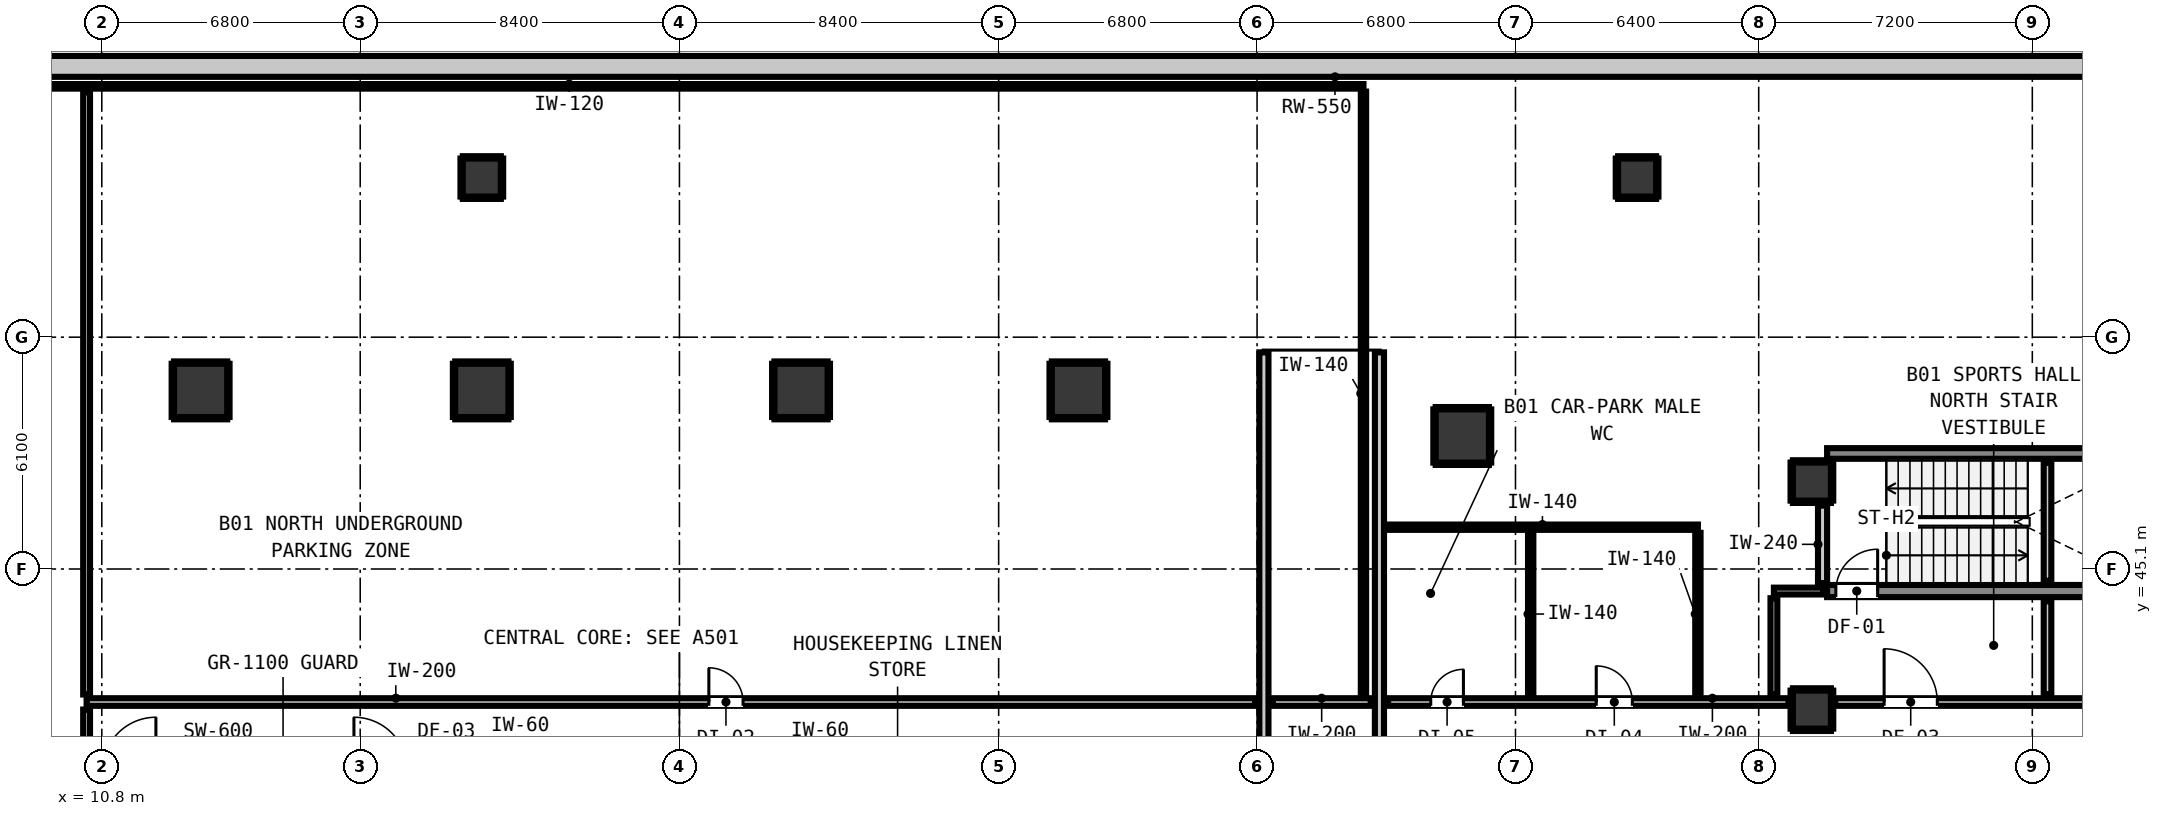
"""IFC4 building model, lengths in metres.
Left out: names, types, materials, properties, quantities, classifications, styles, units other than length and angle.
Written with IfcOpenShell. Run it as: python <this file> out.ifc"""

import sys

from ifc_helpers import new_model, si_unit, direction, frame, frame_2d, origin, origin_2d, place, context, subcontext, project, spatial, rectangle, extrude, element, fill, save


model = new_model("IFC4")
c1 = context("Model", 3, precision=1e-05, world=origin(), true_north=direction((0.0, 1.0)))
c2 = subcontext(c1, "Body", "Model", "MODEL_VIEW")
j1 = project(units=[si_unit("LENGTHUNIT", "METRE"), si_unit("PLANEANGLEUNIT", "RADIAN")], contexts=[c1])
p1 = place(None, origin())
s1 = spatial("IfcSite", under=j1, at=p1, CompositionType="ELEMENT")
p2 = place(p1, origin())
s2 = spatial("IfcBuilding", under=s1, at=p2, CompositionType="ELEMENT")
p3 = place(p2, frame((0.0, 0.0, -4.4)))
s3 = spatial("IfcBuildingStorey", under=s2, at=p3, CompositionType="ELEMENT", Elevation=-4.4)
p4 = place(p3, frame((85.0, 58.325, 0.0), z_axis=(0.0, 0.0, 1.0), x_axis=(-1.0, 0.0, 0.0)))
e1 = element("IfcWall", 1, at=p4, inside=s3, PredefinedType="SOLIDWALL", context=c2, shape_type="SweptSolid", body=[
    extrude(rectangle(XDim=83.5, YDim=0.55, at=frame_2d((41.75, 0.0))), origin(), (0.0, 0.0, 1.0), 4.4),
])
p5 = place(p3, frame((56.2, 48.14, 0.0), z_axis=(0.0, 0.0, 1.0), x_axis=(1.0, 0.0, 0.0)))
e2 = element("IfcWall", 2, at=p5, inside=s3, PredefinedType="SHEAR", context=c2, shape_type="SweptSolid", body=[
    extrude(rectangle(XDim=8.4, YDim=0.28, at=frame_2d((4.2, 0.0))), origin(), (0.0, 0.0, 1.0), 4.4),
])
p6 = place(p3, frame((56.2, 44.52, 0.0), z_axis=(0.0, 0.0, 1.0), x_axis=(1.0, 0.0, 0.0)))
e3 = element("IfcWall", 3, at=p6, inside=s3, PredefinedType="SHEAR", context=c2, shape_type="SweptSolid", body=[
    extrude(rectangle(XDim=8.4, YDim=0.32, at=frame_2d((4.2, 0.0))), origin(), (0.0, 0.0, 1.0), 4.4),
])
p7 = place(p6, frame((0.23, 0.0, 0.0)))
e4 = element("IfcOpeningElement", 4, at=p7, cuts=e3, PredefinedType="OPENING", context=c2, shape_type="SweptSolid", body=[
    extrude(rectangle(XDim=1.1, YDim=2.15, at=frame_2d((0.55, 1.075))), frame((0.0, 0.17, 0.0), z_axis=(0.0, -1.0, 0.0), x_axis=(1.0, 0.0, 0.0)), (0.0, 0.0, 1.0), 0.34),
])
for number, where, z_axis, x_axis in (
    (5, (13.4, 49.8, 0.0), (0.0, 0.0, 1.0), (1.0, 0.0, 0.0)),
    (6, (20.8, 49.8, 0.0), (0.0, 0.0, 1.0), (1.0, 0.0, 0.0)),
    (7, (29.2, 49.8, 0.0), (0.0, 0.0, 1.0), (1.0, 0.0, 0.0)),
    (8, (36.5, 49.8, 0.0), (0.0, 0.0, 1.0), (1.0, 0.0, 0.0)),
    (9, (46.6, 48.6, 0.0), (0.0, 0.0, 1.0), (1.0, 0.0, 0.0)),
):
    element("IfcColumn", number, at=place(p3, frame(where, z_axis=z_axis, x_axis=x_axis)), inside=s3, PredefinedType="COLUMN", context=c2, shape_type="SweptSolid", body=[
        extrude(rectangle(XDim=1.4, YDim=1.4, at=origin_2d()), origin(), (0.0, 0.0, 1.0), 4.4),
    ])
for number, where, z_axis, x_axis in (
    (10, (20.8, 55.4, 0.0), (0.0, 0.0, 1.0), (1.0, 0.0, 0.0)),
    (11, (51.2, 55.4, 0.0), (0.0, 0.0, 1.0), (1.0, 0.0, 0.0)),
):
    element("IfcColumn", number, at=place(p3, frame(where, z_axis=z_axis, x_axis=x_axis)), inside=s3, PredefinedType="COLUMN", context=c2, shape_type="SweptSolid", body=[
        extrude(rectangle(XDim=1.0, YDim=1.0, at=origin_2d()), origin(), (0.0, 0.0, 1.0), 4.16),
    ])
for number, where, z_axis, x_axis in (
    (12, (55.8, 41.4, 0.0), (0.0, 0.0, 1.0), (1.0, 0.0, 0.0)),
    (13, (55.8, 47.4, 0.0), (0.0, 0.0, 1.0), (1.0, 0.0, 0.0)),
):
    element("IfcColumn", number, at=place(p3, frame(where, z_axis=z_axis, x_axis=x_axis)), inside=s3, PredefinedType="COLUMN", context=c2, shape_type="SweptSolid", body=[
        extrude(rectangle(XDim=1.0, YDim=1.0, at=origin_2d()), origin(), (0.0, 0.0, 1.0), 4.4),
    ])
for number, where, z_axis, x_axis in (
    (14, (41.38, 21.95, 0.0), (0.0, 0.0, 1.0), (0.0, 1.0, 0.0)),
    (15, (44.42, 21.95, 0.0), (0.0, 0.0, 1.0), (0.0, 1.0, 0.0)),
):
    element("IfcWall", number, at=place(p3, frame(where, z_axis=z_axis, x_axis=x_axis)), inside=s3, PredefinedType="PARAPET", context=c2, shape_type="SweptSolid", body=[
        extrude(rectangle(XDim=28.85, YDim=0.24, at=frame_2d((14.425, 0.0))), origin(), (0.0, 0.0, 1.0), 3.96),
    ])
p8 = place(p3, frame((56.08, 44.73, 0.0), z_axis=(0.0, 0.0, 1.0), x_axis=(0.0, 1.0, 0.0)))
e16 = element("IfcWall", 16, at=p8, inside=s3, PredefinedType="PARTITIONING", context=c2, shape_type="SweptSolid", body=[
    extrude(rectangle(XDim=2.038, YDim=0.24, at=frame_2d((1.019, 0.0))), origin(), (0.0, 0.0, 1.0), 3.315),
])
p9 = place(p3, frame((10.4, 41.6, 0.0), z_axis=(0.0, 0.0, 1.0), x_axis=(1.0, 0.0, 0.0)))
e17 = element("IfcWall", 17, at=p9, inside=s3, PredefinedType="PARTITIONING", context=c2, shape_type="SweptSolid", body=[
    extrude(rectangle(XDim=30.752, YDim=0.2, at=frame_2d((15.376, 0.0))), origin(), (0.0, 0.0, 1.0), 3.98),
])
p10 = place(p9, frame((16.374, 0.0, 0.0)))
e18 = element("IfcOpeningElement", 18, at=p10, cuts=e17, PredefinedType="OPENING", context=c2, shape_type="SweptSolid", body=[
    extrude(rectangle(XDim=0.9, YDim=2.1, at=frame_2d((0.45, 1.05))), frame((0.0, 0.11, 0.0), z_axis=(0.0, -1.0, 0.0), x_axis=(1.0, 0.0, 0.0)), (0.0, 0.0, 1.0), 0.22),
])
p11 = place(p3, frame((41.608, 41.6, 0.0), z_axis=(0.0, 0.0, 1.0), x_axis=(1.0, 0.0, 0.0)))
e19 = element("IfcWall", 19, at=p11, inside=s3, PredefinedType="PARTITIONING", context=c2, shape_type="SweptSolid", body=[
    extrude(rectangle(XDim=2.584, YDim=0.2, at=frame_2d((1.292, 0.0))), origin(), (0.0, 0.0, 1.0), 3.98),
])
p12 = place(p3, frame((44.648, 41.6, 0.0), z_axis=(0.0, 0.0, 1.0), x_axis=(1.0, 0.0, 0.0)))
e20 = element("IfcWall", 20, at=p12, inside=s3, PredefinedType="PARTITIONING", context=c2, shape_type="SweptSolid", body=[
    extrude(rectangle(XDim=10.54, YDim=0.2, at=frame_2d((5.27, 0.0))), origin(), (0.0, 0.0, 1.0), 3.98),
])
p13 = place(p12, frame((1.122, 0.0, 0.0)))
e21 = element("IfcOpeningElement", 21, at=p13, cuts=e20, PredefinedType="OPENING", context=c2, shape_type="SweptSolid", body=[
    extrude(rectangle(XDim=0.86, YDim=2.02, at=frame_2d((0.43, 1.01))), frame((0.0, 0.11, 0.0), z_axis=(0.0, -1.0, 0.0), x_axis=(1.0, 0.0, 0.0)), (0.0, 0.0, 1.0), 0.22),
])
p14 = place(p12, frame((5.477, 0.0, 0.0)))
e22 = element("IfcOpeningElement", 22, at=p14, cuts=e20, PredefinedType="OPENING", context=c2, shape_type="SweptSolid", body=[
    extrude(rectangle(XDim=0.95, YDim=2.1, at=frame_2d((0.475, 1.05))), frame((0.0, 0.11, 0.0), z_axis=(0.0, -1.0, 0.0), x_axis=(1.0, 0.0, 0.0)), (0.0, 0.0, 1.0), 0.22),
])
p15 = place(p3, frame((56.412, 41.6, 0.0), z_axis=(0.0, 0.0, 1.0), x_axis=(1.0, 0.0, 0.0)))
e23 = element("IfcWall", 23, at=p15, inside=s3, PredefinedType="PARTITIONING", context=c2, shape_type="SweptSolid", body=[
    extrude(rectangle(XDim=24.776, YDim=0.2, at=frame_2d((12.388, 0.0))), origin(), (0.0, 0.0, 1.0), 3.153),
])
p16 = place(p15, frame((1.288, 0.0, 0.0)))
e24 = element("IfcOpeningElement", 24, at=p16, cuts=e23, PredefinedType="OPENING", context=c2, shape_type="SweptSolid", body=[
    extrude(rectangle(XDim=1.4, YDim=2.15, at=frame_2d((0.7, 1.075))), frame((0.0, 0.11, 0.0), z_axis=(0.0, -1.0, 0.0), x_axis=(1.0, 0.0, 0.0)), (0.0, 0.0, 1.0), 0.22),
])
p17 = place(p15, frame((7.528, 0.0, 0.0)))
e25 = element("IfcOpeningElement", 25, at=p17, cuts=e23, PredefinedType="OPENING", context=c2, shape_type="SweptSolid", body=[
    extrude(rectangle(XDim=1.5, YDim=2.15, at=frame_2d((0.75, 1.075))), frame((0.0, 0.11, 0.0), z_axis=(0.0, -1.0, 0.0), x_axis=(1.0, 0.0, 0.0)), (0.0, 0.0, 1.0), 0.22),
])
p18 = place(p3, frame((54.8, 44.52, 0.0), z_axis=(0.0, 0.0, 1.0), x_axis=(1.0, 0.0, 0.0)))
e26 = element("IfcWall", 26, at=p18, inside=s3, PredefinedType="PARTITIONING", context=c2, shape_type="SweptSolid", body=[
    extrude(rectangle(XDim=1.3, YDim=0.18, at=frame_2d((0.65, 0.0))), origin(), (0.0, 0.0, 1.0), 3.98),
])
p19 = place(p3, frame((44.618, 46.2, 0.0), z_axis=(0.0, 0.0, 1.0), x_axis=(1.0, 0.0, 0.0)))
e27 = element("IfcWall", 27, at=p19, inside=s3, PredefinedType="PARTITIONING", context=c2, shape_type="SweptSolid", body=[
    extrude(rectangle(XDim=8.182, YDim=0.14, at=frame_2d((4.091, 0.0))), origin(), (0.0, 0.0, 1.0), 3.98),
])
p20 = place(p3, frame((2.2, 57.8, 0.0), z_axis=(0.0, 0.0, 1.0), x_axis=(1.0, 0.0, 0.0)))
e28 = element("IfcWall", 28, at=p20, inside=s3, PredefinedType="PARTITIONING", context=c2, shape_type="SweptSolid", body=[
    extrude(rectangle(XDim=41.8, YDim=0.12, at=frame_2d((20.9, 0.0))), origin(), (0.0, 0.0, 1.0), 3.98),
])
p21 = place(p3, frame((62.0, 41.808, 0.0), z_axis=(0.0, 0.0, 1.0), x_axis=(0.0, 1.0, 0.0)))
e29 = element("IfcWall", 29, at=p21, inside=s3, PredefinedType="PARTITIONING", context=c2, shape_type="SweptSolid", body=[
    extrude(rectangle(XDim=2.442, YDim=0.2, at=frame_2d((1.221, 0.0))), origin(), (0.0, 0.0, 1.0), 3.98),
])
p22 = place(p3, frame((62.0, 44.79, 0.0), z_axis=(0.0, 0.0, 1.0), x_axis=(0.0, 1.0, 0.0)))
e30 = element("IfcWall", 30, at=p22, inside=s3, PredefinedType="PARTITIONING", context=c2, shape_type="SweptSolid", body=[
    extrude(rectangle(XDim=3.1, YDim=0.2, at=frame_2d((1.55, 0.0))), origin(), (0.0, 0.0, 1.0), 3.98),
])
p23 = place(p3, frame((10.4, 39.988, 0.0), z_axis=(0.0, 0.0, 1.0), x_axis=(0.0, 1.0, 0.0)))
e31 = element("IfcWall", 31, at=p23, inside=s3, PredefinedType="PARTITIONING", context=c2, shape_type="SweptSolid", body=[
    extrude(rectangle(XDim=1.414, YDim=0.18, at=frame_2d((0.707, 0.0))), origin(), (0.0, 0.0, 1.0), 3.98),
])
p24 = place(p3, frame((10.4, 41.798, 0.0), z_axis=(0.0, 0.0, 1.0), x_axis=(0.0, 1.0, 0.0)))
e32 = element("IfcWall", 32, at=p24, inside=s3, PredefinedType="PARTITIONING", context=c2, shape_type="SweptSolid", body=[
    extrude(rectangle(XDim=15.844, YDim=0.18, at=frame_2d((7.922, 0.0))), origin(), (0.0, 0.0, 1.0), 3.98),
])
p25 = place(p3, frame((54.8, 41.798, 0.0), z_axis=(0.0, 0.0, 1.0), x_axis=(0.0, 1.0, 0.0)))
e33 = element("IfcWall", 33, at=p25, inside=s3, PredefinedType="PARTITIONING", context=c2, shape_type="SweptSolid", body=[
    extrude(rectangle(XDim=2.534, YDim=0.18, at=frame_2d((1.267, 0.0))), origin(), (0.0, 0.0, 1.0), 3.98),
])
p26 = place(p3, frame((44.0, 41.778, 0.0), z_axis=(0.0, 0.0, 1.0), x_axis=(0.0, 1.0, 0.0)))
e34 = element("IfcWall", 34, at=p26, inside=s3, PredefinedType="PARTITIONING", context=c2, shape_type="SweptSolid", body=[
    extrude(rectangle(XDim=15.884, YDim=0.14, at=frame_2d((7.942, 0.0))), origin(), (0.0, 0.0, 1.0), 3.98),
])
for number, where, z_axis, x_axis in (
    (35, (48.4, 41.778, 0.0), (0.0, 0.0, 1.0), (0.0, 1.0, 0.0)),
    (36, (52.8, 41.778, 0.0), (0.0, 0.0, 1.0), (0.0, 1.0, 0.0)),
):
    element("IfcWall", number, at=place(p3, frame(where, z_axis=z_axis, x_axis=x_axis)), inside=s3, PredefinedType="PARTITIONING", context=c2, shape_type="SweptSolid", body=[
        extrude(rectangle(XDim=4.274, YDim=0.14, at=frame_2d((2.137, 0.0))), origin(), (0.0, 0.0, 1.0), 3.98),
    ])
for number, where, z_axis, x_axis in (
    (37, (12.7, 49.068, 0.0), (0.0, 0.0, 1.0), (1.0, 0.0, 0.0)),
    (38, (12.7, 50.532, 0.0), (0.0, 0.0, 1.0), (1.0, 0.0, 0.0)),
):
    element("IfcWall", number, at=place(p3, frame(where, z_axis=z_axis, x_axis=x_axis)), inside=s3, PredefinedType="PARTITIONING", context=c2, shape_type="SweptSolid", body=[
        extrude(rectangle(XDim=1.4, YDim=0.06, at=frame_2d((0.7, 0.0))), origin(), (0.0, 0.0, 1.0), 1.45),
    ])
for number, where, z_axis, x_axis in (
    (39, (12.668, 49.1, 0.0), (0.0, 0.0, 1.0), (0.0, 1.0, 0.0)),
    (40, (14.132, 49.1, 0.0), (0.0, 0.0, 1.0), (0.0, 1.0, 0.0)),
    (41, (20.1, 49.068, 0.0), (0.0, 0.0, 1.0), (1.0, 0.0, 0.0)),
    (42, (20.1, 50.532, 0.0), (0.0, 0.0, 1.0), (1.0, 0.0, 0.0)),
    (43, (20.068, 49.1, 0.0), (0.0, 0.0, 1.0), (0.0, 1.0, 0.0)),
    (44, (21.532, 49.1, 0.0), (0.0, 0.0, 1.0), (0.0, 1.0, 0.0)),
    (45, (28.5, 49.068, 0.0), (0.0, 0.0, 1.0), (1.0, 0.0, 0.0)),
    (46, (28.5, 50.532, 0.0), (0.0, 0.0, 1.0), (1.0, 0.0, 0.0)),
    (47, (28.468, 49.1, 0.0), (0.0, 0.0, 1.0), (0.0, 1.0, 0.0)),
    (48, (29.932, 49.1, 0.0), (0.0, 0.0, 1.0), (0.0, 1.0, 0.0)),
    (49, (35.8, 49.068, 0.0), (0.0, 0.0, 1.0), (1.0, 0.0, 0.0)),
    (50, (35.8, 50.532, 0.0), (0.0, 0.0, 1.0), (1.0, 0.0, 0.0)),
    (51, (35.768, 49.1, 0.0), (0.0, 0.0, 1.0), (0.0, 1.0, 0.0)),
    (52, (37.232, 49.1, 0.0), (0.0, 0.0, 1.0), (0.0, 1.0, 0.0)),
):
    element("IfcWall", number, at=place(p3, frame(where, z_axis=z_axis, x_axis=x_axis)), inside=s3, PredefinedType="PARTITIONING", context=c2, shape_type="SweptSolid", body=[
        extrude(rectangle(XDim=1.4, YDim=0.06, at=frame_2d((0.7, 0.0))), origin(), (0.0, 0.0, 1.0), 1.45),
    ])
for number, where, z_axis, x_axis in (
    (53, (45.9, 47.868, 0.0), (0.0, 0.0, 1.0), (1.0, 0.0, 0.0)),
    (54, (45.9, 49.332, 0.0), (0.0, 0.0, 1.0), (1.0, 0.0, 0.0)),
    (55, (45.868, 47.9, 0.0), (0.0, 0.0, 1.0), (0.0, 1.0, 0.0)),
    (56, (47.332, 47.9, 0.0), (0.0, 0.0, 1.0), (0.0, 1.0, 0.0)),
):
    element("IfcWall", number, at=place(p3, frame(where, z_axis=z_axis, x_axis=x_axis)), inside=s3, PredefinedType="PARTITIONING", context=c2, shape_type="SweptSolid", body=[
        extrude(rectangle(XDim=1.4, YDim=0.06, at=frame_2d((0.7, 0.0))), origin(), (0.0, 0.0, 1.0), 1.45),
    ])
for number, where, z_axis, x_axis in (
    (57, (20.3, 54.868, 0.0), (0.0, 0.0, 1.0), (1.0, 0.0, 0.0)),
    (58, (20.3, 55.932, 0.0), (0.0, 0.0, 1.0), (1.0, 0.0, 0.0)),
    (59, (20.268, 54.9, 0.0), (0.0, 0.0, 1.0), (0.0, 1.0, 0.0)),
    (60, (21.332, 54.9, 0.0), (0.0, 0.0, 1.0), (0.0, 1.0, 0.0)),
    (61, (50.7, 54.868, 0.0), (0.0, 0.0, 1.0), (1.0, 0.0, 0.0)),
    (62, (50.7, 55.932, 0.0), (0.0, 0.0, 1.0), (1.0, 0.0, 0.0)),
    (63, (50.668, 54.9, 0.0), (0.0, 0.0, 1.0), (0.0, 1.0, 0.0)),
    (64, (51.732, 54.9, 0.0), (0.0, 0.0, 1.0), (0.0, 1.0, 0.0)),
    (65, (55.3, 40.868, 0.0), (0.0, 0.0, 1.0), (1.0, 0.0, 0.0)),
    (66, (55.3, 41.932, 0.0), (0.0, 0.0, 1.0), (1.0, 0.0, 0.0)),
    (67, (55.268, 40.9, 0.0), (0.0, 0.0, 1.0), (0.0, 1.0, 0.0)),
    (68, (56.332, 40.9, 0.0), (0.0, 0.0, 1.0), (0.0, 1.0, 0.0)),
    (69, (55.3, 46.868, 0.0), (0.0, 0.0, 1.0), (1.0, 0.0, 0.0)),
    (70, (55.3, 47.932, 0.0), (0.0, 0.0, 1.0), (1.0, 0.0, 0.0)),
    (71, (55.268, 46.9, 0.0), (0.0, 0.0, 1.0), (0.0, 1.0, 0.0)),
    (72, (56.332, 46.9, 0.0), (0.0, 0.0, 1.0), (0.0, 1.0, 0.0)),
):
    element("IfcWall", number, at=place(p3, frame(where, z_axis=z_axis, x_axis=x_axis)), inside=s3, PredefinedType="PARTITIONING", context=c2, shape_type="SweptSolid", body=[
        extrude(rectangle(XDim=1.0, YDim=0.06, at=frame_2d((0.5, 0.0))), origin(), (0.0, 0.0, 1.0), 1.45),
    ])
p27 = place(p7, origin())
e73 = element("IfcDoor", 73, at=p27, inside=s3, OperationType="SINGLE_SWING_RIGHT", PredefinedType="DOOR", context=c2, shape_type="SweptSolid", body=[
    extrude(rectangle(XDim=1.1, YDim=2.15, at=frame_2d((0.55, 1.075))), frame((0.0, 0.025, 0.0), z_axis=(0.0, -1.0, 0.0), x_axis=(1.0, 0.0, 0.0)), (0.0, 0.0, 1.0), 0.05),
])
fill(e4, e73)
p28 = place(p16, origin())
e74 = element("IfcDoor", 74, at=p28, inside=s3, OperationType="SINGLE_SWING_LEFT", PredefinedType="DOOR", context=c2, shape_type="SweptSolid", body=[
    extrude(rectangle(XDim=1.4, YDim=2.15, at=frame_2d((0.7, 1.075))), frame((0.0, 0.025, 0.0), z_axis=(0.0, -1.0, 0.0), x_axis=(1.0, 0.0, 0.0)), (0.0, 0.0, 1.0), 0.05),
])
fill(e24, e74)
p29 = place(p10, origin())
e75 = element("IfcDoor", 75, at=p29, inside=s3, OperationType="SINGLE_SWING_LEFT", PredefinedType="DOOR", context=c2, shape_type="SweptSolid", body=[
    extrude(rectangle(XDim=0.9, YDim=2.1, at=frame_2d((0.45, 1.05))), frame((0.0, 0.025, 0.0), z_axis=(0.0, -1.0, 0.0), x_axis=(1.0, 0.0, 0.0)), (0.0, 0.0, 1.0), 0.05),
])
fill(e18, e75)
p30 = place(p13, origin())
e76 = element("IfcDoor", 76, at=p30, inside=s3, OperationType="SINGLE_SWING_RIGHT", PredefinedType="DOOR", context=c2, shape_type="SweptSolid", body=[
    extrude(rectangle(XDim=0.86, YDim=2.02, at=frame_2d((0.43, 1.01))), frame((0.0, 0.025, 0.0), z_axis=(0.0, -1.0, 0.0), x_axis=(1.0, 0.0, 0.0)), (0.0, 0.0, 1.0), 0.05),
])
fill(e21, e76)
p31 = place(p14, origin())
e77 = element("IfcDoor", 77, at=p31, inside=s3, OperationType="SINGLE_SWING_LEFT", PredefinedType="DOOR", context=c2, shape_type="SweptSolid", body=[
    extrude(rectangle(XDim=0.95, YDim=2.1, at=frame_2d((0.475, 1.05))), frame((0.0, 0.025, 0.0), z_axis=(0.0, -1.0, 0.0), x_axis=(1.0, 0.0, 0.0)), (0.0, 0.0, 1.0), 0.05),
])
fill(e22, e77)
save(model, sys.argv[1])
